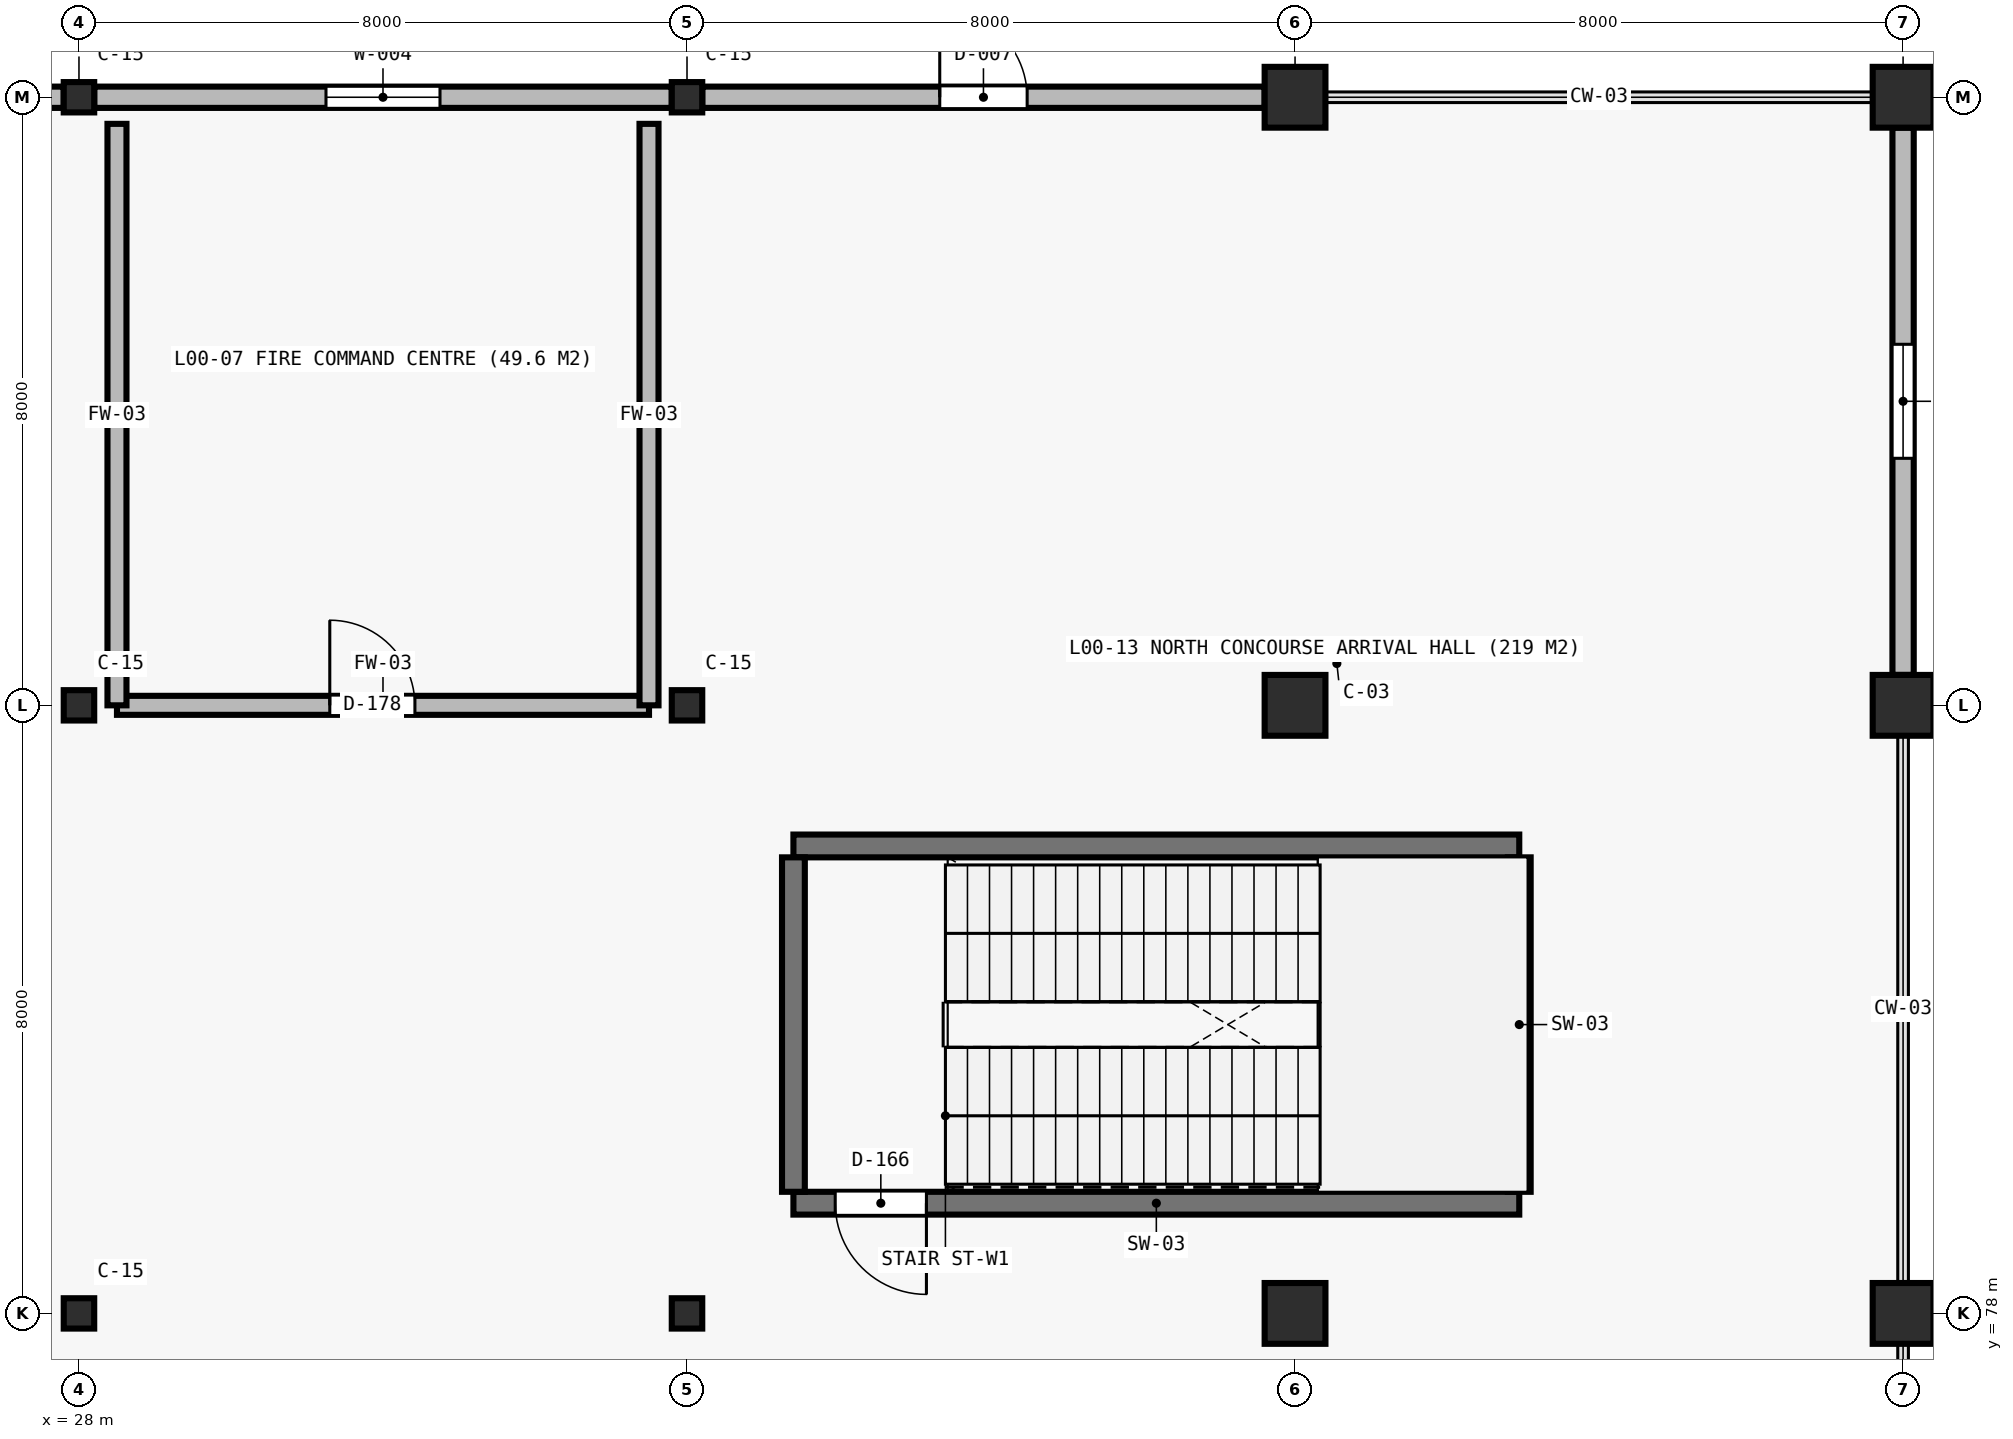
"""IFC4 building model, lengths in metres.
Left out: names, types, materials, properties, quantities, classifications, styles, units other than length and angle.
Written with IfcOpenShell. Run it as: python <this file> out.ifc"""

import sys

from ifc_helpers import new_model, si_unit, direction, frame, frame_2d, origin, origin_2d, place, context, subcontext, project, spatial, rectangle, i_section, extrude, element, fill, save


model = new_model("IFC4")
c1 = context("Model", 3, precision=1e-05, world=origin(), true_north=direction((0.0, 1.0)))
c2 = subcontext(c1, "Body", "Model", "MODEL_VIEW")
j1 = project(units=[si_unit("LENGTHUNIT", "METRE"), si_unit("PLANEANGLEUNIT", "RADIAN")], contexts=[c1])
p1 = place(None, origin())
s1 = spatial("IfcSite", under=j1, at=p1, CompositionType="ELEMENT")
p2 = place(p1, origin())
s2 = spatial("IfcBuilding", under=s1, at=p2, CompositionType="ELEMENT")
p3 = place(p2, origin())
s3 = spatial("IfcBuildingStorey", under=s2, at=p3, CompositionType="ELEMENT", Elevation=0.0)
for number, where, z_axis, x_axis in (
    (1, (28.0, 78.0, 0.0), (0.0, 0.0, 1.0), (1.0, 0.0, 0.0)),
    (2, (28.0, 86.0, 0.0), (0.0, 0.0, 1.0), (1.0, 0.0, 0.0)),
    (3, (28.0, 94.0, 0.0), (0.0, 0.0, 1.0), (1.0, 0.0, 0.0)),
    (4, (36.0, 78.0, 0.0), (0.0, 0.0, 1.0), (1.0, 0.0, 0.0)),
    (5, (36.0, 86.0, 0.0), (0.0, 0.0, 1.0), (1.0, 0.0, 0.0)),
    (6, (36.0, 94.0, 0.0), (0.0, 0.0, 1.0), (1.0, 0.0, 0.0)),
):
    element("IfcColumn", number, at=place(p3, frame(where, z_axis=z_axis, x_axis=x_axis)), inside=s3, PredefinedType="COLUMN", context=c2, shape_type="SweptSolid", body=[
        extrude(i_section(OverallWidth=0.401, OverallDepth=0.399, WebThickness=0.025, FlangeThickness=0.04, at=origin_2d()), origin(), (0.0, 0.0, 1.0), 6.02),
    ])
for number, where, z_axis, x_axis in (
    (7, (44.0, 78.0, 0.0), (0.0, 0.0, 1.0), (1.0, 0.0, 0.0)),
    (8, (44.0, 86.0, 0.0), (0.0, 0.0, 1.0), (1.0, 0.0, 0.0)),
    (9, (44.0, 94.0, 0.0), (0.0, 0.0, 1.0), (1.0, 0.0, 0.0)),
    (10, (52.0, 78.0, 0.0), (0.0, 0.0, 1.0), (1.0, 0.0, 0.0)),
    (11, (52.0, 86.0, 0.0), (0.0, 0.0, 1.0), (1.0, 0.0, 0.0)),
    (12, (52.0, 94.0, 0.0), (0.0, 0.0, 1.0), (1.0, 0.0, 0.0)),
):
    element("IfcColumn", number, at=place(p3, frame(where, z_axis=z_axis, x_axis=x_axis)), inside=s3, PredefinedType="COLUMN", context=c2, shape_type="SweptSolid", body=[
        extrude(rectangle(XDim=0.8, YDim=0.8, at=origin_2d()), origin(), (0.0, 0.0, 1.0), 6.02),
    ])
p4 = place(p3, frame((37.4, 84.15, 0.0), z_axis=(0.0, 0.0, 1.0), x_axis=(1.0, 0.0, 0.0)))
e13 = element("IfcWall", 13, at=p4, inside=s3, PredefinedType="SHEAR", context=c2, shape_type="SweptSolid", body=[
    extrude(rectangle(XDim=9.55, YDim=0.3, at=frame_2d((4.775, 0.0))), origin(), (0.0, 0.0, 1.0), 6.02),
])
p5 = place(p3, frame((37.4, 79.45, 0.0), z_axis=(0.0, 0.0, 1.0), x_axis=(1.0, 0.0, 0.0)))
e14 = element("IfcWall", 14, at=p5, inside=s3, PredefinedType="SHEAR", context=c2, shape_type="SweptSolid", body=[
    extrude(rectangle(XDim=9.55, YDim=0.3, at=frame_2d((4.775, 0.0))), origin(), (0.0, 0.0, 1.0), 6.02),
])
p6 = place(p5, frame((0.55, 0.0, 0.0)))
e15 = element("IfcOpeningElement", 15, at=p6, cuts=e14, PredefinedType="OPENING", context=c2, shape_type="SweptSolid", body=[
    extrude(rectangle(XDim=1.2, YDim=2.2, at=frame_2d((0.6, 1.1))), frame((0.0, 0.16, 0.0), z_axis=(0.0, -1.0, 0.0), x_axis=(1.0, 0.0, 0.0)), (0.0, 0.0, 1.0), 0.32),
])
for number, where, z_axis, x_axis in (
    (16, (37.4, 79.6, 0.0), (0.0, 0.0, 1.0), (0.0, 1.0, 0.0)),
    (17, (46.95, 79.6, 0.0), (0.0, 0.0, 1.0), (0.0, 1.0, 0.0)),
):
    element("IfcWall", number, at=place(p3, frame(where, z_axis=z_axis, x_axis=x_axis)), inside=s3, PredefinedType="SHEAR", context=c2, shape_type="SweptSolid", body=[
        extrude(rectangle(XDim=4.4, YDim=0.3, at=frame_2d((2.2, 0.0))), origin(), (0.0, 0.0, 1.0), 6.02),
    ])
p7 = place(p3, frame((20.2, 94.0, 0.0), z_axis=(0.0, 0.0, 1.0), x_axis=(1.0, 0.0, 0.0)))
e18 = element("IfcWall", 18, at=p7, inside=s3, PredefinedType="STANDARD", context=c2, shape_type="SweptSolid", body=[
    extrude(rectangle(XDim=7.599, YDim=0.28, at=frame_2d((3.8, 0.0))), origin(), (0.0, 0.0, 1.0), 4.92),
])
p8 = place(p7, frame((2.774, 0.0, 0.0)))
e19 = element("IfcOpeningElement", 19, at=p8, cuts=e18, PredefinedType="OPENING", context=c2, shape_type="SweptSolid", body=[
    extrude(rectangle(XDim=2.05, YDim=2.25, at=frame_2d((1.025, 1.125))), frame((0.0, 0.15, 0.0), z_axis=(0.0, -1.0, 0.0), x_axis=(1.0, 0.0, 0.0)), (0.0, 0.0, 1.0), 0.3),
])
p9 = place(p3, frame((28.2, 94.0, 0.0), z_axis=(0.0, 0.0, 1.0), x_axis=(1.0, 0.0, 0.0)))
e20 = element("IfcWall", 20, at=p9, inside=s3, PredefinedType="STANDARD", context=c2, shape_type="SweptSolid", body=[
    extrude(rectangle(XDim=7.599, YDim=0.28, at=frame_2d((3.8, 0.0))), origin(), (0.0, 0.0, 1.0), 4.92),
])
p10 = place(p9, frame((3.05, 0.0, 0.95)))
e21 = element("IfcOpeningElement", 21, at=p10, cuts=e20, PredefinedType="OPENING", context=c2, shape_type="SweptSolid", body=[
    extrude(rectangle(XDim=1.5, YDim=2.0, at=frame_2d((0.75, 1.0))), frame((0.0, 0.15, 0.0), z_axis=(0.0, -1.0, 0.0), x_axis=(1.0, 0.0, 0.0)), (0.0, 0.0, 1.0), 0.3),
])
p11 = place(p3, frame((36.2, 94.0, 0.0), z_axis=(0.0, 0.0, 1.0), x_axis=(1.0, 0.0, 0.0)))
e22 = element("IfcWall", 22, at=p11, inside=s3, PredefinedType="STANDARD", context=c2, shape_type="SweptSolid", body=[
    extrude(rectangle(XDim=7.4, YDim=0.28, at=frame_2d((3.7, 0.0))), origin(), (0.0, 0.0, 1.0), 4.92),
])
p12 = place(p11, frame((3.125, 0.0, 0.0)))
e23 = element("IfcOpeningElement", 23, at=p12, cuts=e22, PredefinedType="OPENING", context=c2, shape_type="SweptSolid", body=[
    extrude(rectangle(XDim=1.15, YDim=2.2, at=frame_2d((0.575, 1.1))), frame((0.0, 0.15, 0.0), z_axis=(0.0, -1.0, 0.0), x_axis=(1.0, 0.0, 0.0)), (0.0, 0.0, 1.0), 0.3),
])
p13 = place(p3, frame((52.0, 93.6, 0.0), z_axis=(0.0, 0.0, 1.0), x_axis=(0.0, -1.0, 0.0)))
e24 = element("IfcWall", 24, at=p13, inside=s3, PredefinedType="STANDARD", context=c2, shape_type="SweptSolid", body=[
    extrude(rectangle(XDim=7.2, YDim=0.28, at=frame_2d((3.6, 0.0))), origin(), (0.0, 0.0, 1.0), 5.408),
])
p14 = place(p13, frame((2.85, 0.0, 0.95)))
e25 = element("IfcOpeningElement", 25, at=p14, cuts=e24, PredefinedType="OPENING", context=c2, shape_type="SweptSolid", body=[
    extrude(rectangle(XDim=1.5, YDim=2.0, at=frame_2d((0.75, 1.0))), frame((0.0, 0.15, 0.0), z_axis=(0.0, -1.0, 0.0), x_axis=(1.0, 0.0, 0.0)), (0.0, 0.0, 1.0), 0.3),
])
p15 = place(p3, frame((28.5, 86.0, 0.0), z_axis=(0.0, 0.0, 1.0), x_axis=(1.0, 0.0, 0.0)))
e26 = element("IfcWall", 26, at=p15, inside=s3, PredefinedType="SOLIDWALL", context=c2, shape_type="SweptSolid", body=[
    extrude(rectangle(XDim=7.0, YDim=0.25, at=frame_2d((3.5, 0.0))), origin(), (0.0, 0.0, 1.0), 4.92),
])
p16 = place(p15, frame((2.8, 0.0, 0.0)))
e27 = element("IfcOpeningElement", 27, at=p16, cuts=e26, PredefinedType="OPENING", context=c2, shape_type="SweptSolid", body=[
    extrude(rectangle(XDim=1.12, YDim=2.22, at=frame_2d((0.56, 1.11))), frame((0.0, 0.135, 0.0), z_axis=(0.0, -1.0, 0.0), x_axis=(1.0, 0.0, 0.0)), (0.0, 0.0, 1.0), 0.27),
])
for number, where, z_axis, x_axis in (
    (28, (28.5, 86.0, 0.0), (0.0, 0.0, 1.0), (0.0, 1.0, 0.0)),
    (29, (35.5, 86.0, 0.0), (0.0, 0.0, 1.0), (0.0, 1.0, 0.0)),
):
    element("IfcWall", number, at=place(p3, frame(where, z_axis=z_axis, x_axis=x_axis)), inside=s3, PredefinedType="SOLIDWALL", context=c2, shape_type="SweptSolid", body=[
        extrude(rectangle(XDim=7.65, YDim=0.25, at=frame_2d((3.825, 0.0))), origin(), (0.0, 0.0, 1.0), 6.02),
    ])
p17 = place(p10, origin())
e30 = element("IfcWindow", 30, at=p17, inside=s3, PartitioningType="SINGLE_PANEL", PredefinedType="WINDOW", context=c2, shape_type="SweptSolid", body=[
    extrude(rectangle(XDim=1.5, YDim=2.0, at=frame_2d((0.75, 1.0))), frame((0.0, 0.03, 0.0), z_axis=(0.0, -1.0, 0.0), x_axis=(1.0, 0.0, 0.0)), (0.0, 0.0, 1.0), 0.06),
])
fill(e21, e30)
p18 = place(p12, origin())
e31 = element("IfcDoor", 31, at=p18, inside=s3, OperationType="SINGLE_SWING_LEFT", PredefinedType="DOOR", context=c2, shape_type="SweptSolid", body=[
    extrude(rectangle(XDim=1.15, YDim=2.2, at=frame_2d((0.575, 1.1))), frame((0.0, 0.025, 0.0), z_axis=(0.0, -1.0, 0.0), x_axis=(1.0, 0.0, 0.0)), (0.0, 0.0, 1.0), 0.05),
])
fill(e23, e31)
p19 = place(p14, origin())
e32 = element("IfcWindow", 32, at=p19, inside=s3, PartitioningType="SINGLE_PANEL", PredefinedType="WINDOW", context=c2, shape_type="SweptSolid", body=[
    extrude(rectangle(XDim=1.5, YDim=2.0, at=frame_2d((0.75, 1.0))), frame((0.0, 0.03, 0.0), z_axis=(0.0, -1.0, 0.0), x_axis=(1.0, 0.0, 0.0)), (0.0, 0.0, 1.0), 0.06),
])
fill(e25, e32)
p20 = place(p6, frame((1.2, 0.0, 0.0), z_axis=(0.0, 0.0, 1.0), x_axis=(-1.0, 0.0, 0.0)))
e33 = element("IfcDoor", 33, at=p20, inside=s3, OperationType="SINGLE_SWING_LEFT", PredefinedType="DOOR", context=c2, shape_type="SweptSolid", body=[
    extrude(rectangle(XDim=1.2, YDim=2.2, at=frame_2d((0.6, 1.1))), frame((0.0, 0.025, 0.0), z_axis=(0.0, -1.0, 0.0), x_axis=(1.0, 0.0, 0.0)), (0.0, 0.0, 1.0), 0.05),
])
fill(e15, e33)
p21 = place(p16, origin())
e34 = element("IfcDoor", 34, at=p21, inside=s3, OperationType="SINGLE_SWING_LEFT", PredefinedType="DOOR", context=c2, shape_type="SweptSolid", body=[
    extrude(rectangle(XDim=1.12, YDim=2.22, at=frame_2d((0.56, 1.11))), frame((0.0, 0.025, 0.0), z_axis=(0.0, -1.0, 0.0), x_axis=(1.0, 0.0, 0.0)), (0.0, 0.0, 1.0), 0.05),
])
fill(e27, e34)
save(model, sys.argv[1])
